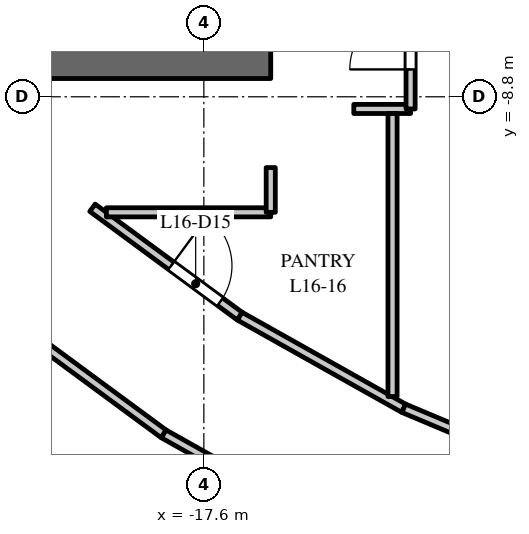
"""IFC4 building model, lengths in metres.
Left out: names, types, materials, properties, quantities, classifications, styles, units other than length and angle.
Written with IfcOpenShell. Run it as: python <this file> out.ifc"""

import sys

from ifc_helpers import new_model, si_unit, direction, frame, frame_2d, origin, place, context, subcontext, project, spatial, rectangle, extrude, element, fill, save


model = new_model("IFC4")
c1 = context("Model", 3, precision=1e-05, world=origin(), true_north=direction((0.0, 1.0)))
c2 = subcontext(c1, "Body", "Model", "MODEL_VIEW")
j1 = project(units=[si_unit("LENGTHUNIT", "METRE"), si_unit("PLANEANGLEUNIT", "RADIAN")], contexts=[c1])
p1 = place(None, origin())
s1 = spatial("IfcSite", under=j1, at=p1, CompositionType="ELEMENT")
p2 = place(p1, origin())
s2 = spatial("IfcBuilding", under=s1, at=p2, CompositionType="ELEMENT")
p3 = place(p2, frame((0.0, 0.0, 74.5)))
s3 = spatial("IfcBuildingStorey", under=s2, at=p3, CompositionType="ELEMENT", Elevation=74.5)
p4 = place(p3, frame((-16.5, -8.25, 0.0), z_axis=(0.0, 0.0, 1.0), x_axis=(-1.0, 0.0, 0.0)))
e1 = element("IfcWall", 1, at=p4, inside=s3, PredefinedType="SHEAR", context=c2, shape_type="SweptSolid", body=[
    extrude(rectangle(XDim=15.0, YDim=0.5, at=frame_2d((7.5, 0.0))), origin(), (0.0, 0.0, 1.0), 3.7),
])
p5 = place(p4, frame((6.9, 0.0, 0.0)))
e2 = element("IfcOpeningElement", 2, at=p5, cuts=e1, PredefinedType="OPENING", context=c2, shape_type="SweptSolid", body=[
    extrude(rectangle(XDim=1.2, YDim=2.1, at=frame_2d((0.6, 1.05))), frame((0.0, 0.26, 0.0), z_axis=(0.0, -1.0, 0.0), x_axis=(1.0, 0.0, 0.0)), (0.0, 0.0, 1.0), 0.52),
])
p6 = place(p4, frame((12.425, 0.0, 0.0)))
e3 = element("IfcOpeningElement", 3, at=p6, cuts=e1, PredefinedType="OPENING", context=c2, shape_type="SweptSolid", body=[
    extrude(rectangle(XDim=0.9, YDim=2.1, at=frame_2d((0.45, 1.05))), frame((0.0, 0.26, 0.0), z_axis=(0.0, -1.0, 0.0), x_axis=(1.0, 0.0, 0.0)), (0.0, 0.0, 1.0), 0.52),
])
p7 = place(p3, frame((-20.891, -12.407, 0.0), z_axis=(0.0, 0.0, 1.0), x_axis=(0.805303685339, -0.592862525701, 0.0)))
e4 = element("IfcWall", 4, at=p7, inside=s3, PredefinedType="PARTITIONING", context=c2, shape_type="SweptSolid", body=[
    extrude(rectangle(XDim=3.267, YDim=0.15, at=frame_2d((1.634, 0.0))), origin(), (0.0, 0.0, 1.0), 2.75),
])
p8 = place(p3, frame((-19.432, -10.625, 0.0), z_axis=(0.0, 0.0, 1.0), x_axis=(0.805306738654, -0.592858378265, 0.0)))
e5 = element("IfcWall", 5, at=p8, inside=s3, PredefinedType="PARTITIONING", context=c2, shape_type="SweptSolid", body=[
    extrude(rectangle(XDim=3.007, YDim=0.15, at=frame_2d((1.504, 0.0))), origin(), (0.0, 0.0, 1.0), 2.75),
])
p9 = place(p8, frame((1.607, 0.0, 0.0)))
e6 = element("IfcOpeningElement", 6, at=p9, cuts=e5, PredefinedType="OPENING", context=c2, shape_type="SweptSolid", body=[
    extrude(rectangle(XDim=1.0, YDim=2.1, at=frame_2d((0.5, 1.05))), frame((0.0, 0.085, 0.0), z_axis=(0.0, -1.0, 0.0), x_axis=(1.0, 0.0, 0.0)), (0.0, 0.0, 1.0), 0.17),
])
p10 = place(p3, frame((-19.203, -10.7, 0.0), z_axis=(0.0, 0.0, 1.0), x_axis=(1.0, 0.0, 0.0)))
e7 = element("IfcWall", 7, at=p10, inside=s3, PredefinedType="PARTITIONING", context=c2, shape_type="SweptSolid", body=[
    extrude(rectangle(XDim=2.703, YDim=0.15, at=frame_2d((1.352, 0.0))), origin(), (0.0, 0.0, 1.0), 3.7),
])
p11 = place(p3, frame((-18.26, -14.344, 0.0), z_axis=(0.0, 0.0, 1.0), x_axis=(0.871958798398, -0.489579262118, 0.0)))
e8 = element("IfcWall", 8, at=p11, inside=s3, PredefinedType="PARTITIONING", context=c2, shape_type="SweptSolid", body=[
    extrude(rectangle(XDim=3.366, YDim=0.15, at=frame_2d((1.683, 0.0))), origin(), (0.0, 0.0, 1.0), 3.7),
])
p12 = place(p3, frame((-17.01, -12.408, 0.0), z_axis=(0.0, 0.0, 1.0), x_axis=(0.871977874087, -0.489545286059, 0.0)))
e9 = element("IfcWall", 9, at=p12, inside=s3, PredefinedType="PARTITIONING", context=c2, shape_type="SweptSolid", body=[
    extrude(rectangle(XDim=3.093, YDim=0.15, at=frame_2d((1.546, 0.0))), origin(), (0.0, 0.0, 1.0), 3.7),
])
p13 = place(p3, frame((-16.5, -10.7, 0.0), z_axis=(0.0, 0.0, 1.0), x_axis=(0.0, 1.0, 0.0)))
e10 = element("IfcWall", 10, at=p13, inside=s3, PredefinedType="PARTITIONING", context=c2, shape_type="SweptSolid", body=[
    extrude(rectangle(XDim=0.736, YDim=0.15, at=frame_2d((0.368, 0.0))), origin(), (0.0, 0.0, 1.0), 3.7),
])
p14 = place(p3, frame((-15.134, -9.0, 0.0), z_axis=(0.0, 0.0, 1.0), x_axis=(1.0, 0.0, 0.0)))
e11 = element("IfcWall", 11, at=p14, inside=s3, PredefinedType="PARTITIONING", context=c2, shape_type="SweptSolid", body=[
    extrude(rectangle(XDim=0.934, YDim=0.15, at=frame_2d((0.467, 0.0))), origin(), (0.0, 0.0, 1.0), 3.7),
])
p15 = place(p3, frame((-14.497, -13.729, 0.0), z_axis=(0.0, 0.0, 1.0), x_axis=(0.0, 1.0, 0.0)))
e12 = element("IfcWall", 12, at=p15, inside=s3, PredefinedType="PARTITIONING", context=c2, shape_type="SweptSolid", body=[
    extrude(rectangle(XDim=4.654, YDim=0.15, at=frame_2d((2.327, 0.0))), origin(), (0.0, 0.0, 1.0), 2.75),
])
p16 = place(p3, frame((-14.313, -13.922, 0.0), z_axis=(0.0, 0.0, 1.0), x_axis=(0.921799502591, -0.387666966638, 0.0)))
e13 = element("IfcWall", 13, at=p16, inside=s3, PredefinedType="PARTITIONING", context=c2, shape_type="SweptSolid", body=[
    extrude(rectangle(XDim=3.19, YDim=0.15, at=frame_2d((1.595, 0.0))), origin(), (0.0, 0.0, 1.0), 2.85),
])
p17 = place(p3, frame((-14.2, -9.0, 0.0), z_axis=(0.0, 0.0, 1.0), x_axis=(0.0, 1.0, 0.0)))
e14 = element("IfcWall", 14, at=p17, inside=s3, PredefinedType="PARTITIONING", context=c2, shape_type="SweptSolid", body=[
    extrude(rectangle(XDim=10.782, YDim=0.15, at=frame_2d((5.391, 0.0))), origin(), (0.0, 0.0, 1.0), 3.7),
])
p18 = place(p17, frame((0.65, 0.0, 0.0)))
e15 = element("IfcOpeningElement", 15, at=p18, cuts=e14, PredefinedType="OPENING", context=c2, shape_type="SweptSolid", body=[
    extrude(rectangle(XDim=1.0, YDim=2.1, at=frame_2d((0.5, 1.05))), frame((0.0, 0.085, 0.0), z_axis=(0.0, -1.0, 0.0), x_axis=(1.0, 0.0, 0.0)), (0.0, 0.0, 1.0), 0.17),
])
p19 = place(p18, origin())
e16 = element("IfcDoor", 16, at=p19, inside=s3, OperationType="SINGLE_SWING_LEFT", PredefinedType="DOOR", context=c2, shape_type="SweptSolid", body=[
    extrude(rectangle(XDim=1.0, YDim=2.1, at=frame_2d((0.5, 1.05))), frame((0.0, 0.025, 0.0), z_axis=(0.0, -1.0, 0.0), x_axis=(1.0, 0.0, 0.0)), (0.0, 0.0, 1.0), 0.05),
])
fill(e15, e16)
p20 = place(p9, origin())
e17 = element("IfcDoor", 17, at=p20, inside=s3, OperationType="SINGLE_SWING_LEFT", PredefinedType="DOOR", context=c2, shape_type="SweptSolid", body=[
    extrude(rectangle(XDim=1.0, YDim=2.1, at=frame_2d((0.5, 1.05))), frame((0.0, 0.025, 0.0), z_axis=(0.0, -1.0, 0.0), x_axis=(1.0, 0.0, 0.0)), (0.0, 0.0, 1.0), 0.05),
])
fill(e6, e17)
save(model, sys.argv[1])
